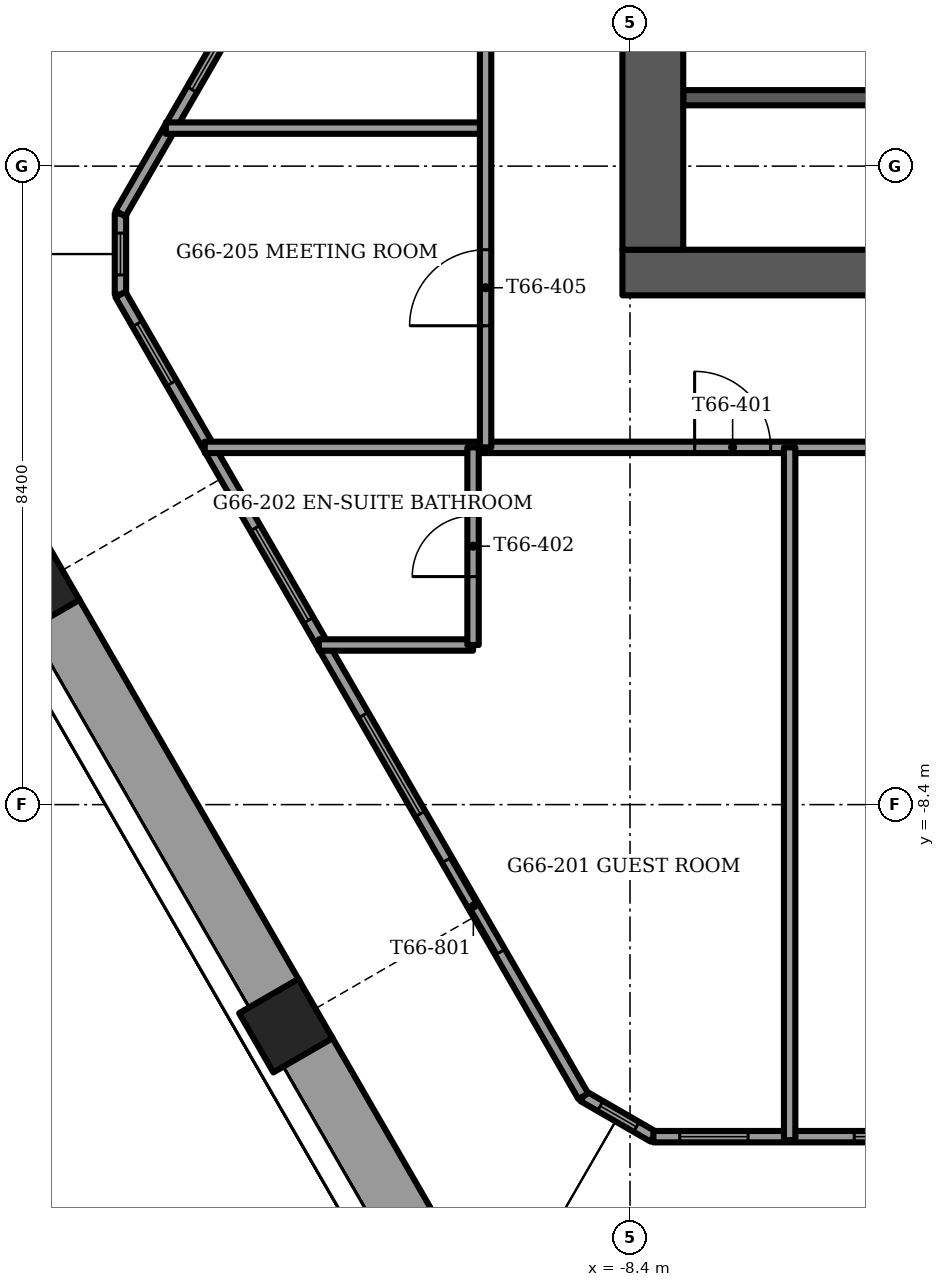
"""IFC4 building model, lengths in metres.
Left out: names, types, materials, properties, quantities, classifications, styles, units other than length and angle.
Written with IfcOpenShell. Run it as: python <this file> out.ifc"""

import sys

from ifc_helpers import new_model, si_unit, direction, frame, frame_2d, origin, origin_2d, place, context, subcontext, project, spatial, rectangle, extrude, element, fill, save


model = new_model("IFC4")
c1 = context("Model", 3, precision=1e-05, world=origin(), true_north=direction((0.0, 1.0)))
c2 = subcontext(c1, "Body", "Model", "MODEL_VIEW")
j1 = project(units=[si_unit("LENGTHUNIT", "METRE"), si_unit("PLANEANGLEUNIT", "RADIAN")], contexts=[c1])
p1 = place(None, origin())
s1 = spatial("IfcSite", under=j1, at=p1, CompositionType="ELEMENT")
p2 = place(p1, origin())
s2 = spatial("IfcBuilding", under=s1, at=p2, CompositionType="ELEMENT")
p3 = place(p2, frame((0.0, 0.0, 267.5)))
s3 = spatial("IfcBuildingStorey", under=s2, at=p3, CompositionType="ELEMENT", Elevation=267.5)
for number, where, z_axis, x_axis in (
    (1, (-16.257, -5.542, -1.2), (0.0, 0.0, 1.0), (-0.5, 0.866, 0.0)),
    (2, (-12.928, -11.308, -1.2), (0.0, 0.0, 1.0), (-0.5, 0.866, 0.0)),
):
    element("IfcColumn", number, at=place(p3, frame(where, z_axis=z_axis, x_axis=x_axis)), inside=s3, PredefinedType="COLUMN", context=c2, shape_type="SweptSolid", body=[
        extrude(rectangle(XDim=0.9, YDim=0.9, at=origin_2d()), origin(), (0.0, 0.0, 1.0), 3.75),
    ])
p4 = place(p3, frame((-8.5, -1.4, -0.3), z_axis=(0.0, 0.0, 1.0), x_axis=(1.0, 0.0, 0.0)))
e3 = element("IfcWall", 3, at=p4, inside=s3, PredefinedType="SHEAR", context=c2, shape_type="SweptSolid", body=[
    extrude(rectangle(XDim=17.0, YDim=0.6, at=frame_2d((8.5, 0.0))), origin(), (0.0, 0.0, 1.0), 3.75),
])
p5 = place(p4, frame((7.7, 0.0, 0.0)))
e4 = element("IfcOpeningElement", 4, at=p5, cuts=e3, PredefinedType="OPENING", context=c2, shape_type="SweptSolid", body=[
    extrude(rectangle(XDim=1.6, YDim=2.1, at=frame_2d((0.8, 1.05))), frame((0.0, 0.3, 0.0), z_axis=(0.0, -1.0, 0.0), x_axis=(1.0, 0.0, 0.0)), (0.0, 0.0, 1.0), 0.6),
])
p6 = place(p3, frame((-8.1, -1.1, -0.3), z_axis=(0.0, 0.0, 1.0), x_axis=(0.0, 1.0, 0.0)))
e5 = element("IfcWall", 5, at=p6, inside=s3, PredefinedType="SHEAR", context=c2, shape_type="SweptSolid", body=[
    extrude(rectangle(XDim=10.2, YDim=0.8, at=frame_2d((5.1, 0.0))), origin(), (0.0, 0.0, 1.0), 3.75),
])
p7 = place(p6, frame((8.35, 0.0, 0.0)))
e6 = element("IfcOpeningElement", 6, at=p7, cuts=e5, PredefinedType="OPENING", context=c2, shape_type="SweptSolid", body=[
    extrude(rectangle(XDim=1.1, YDim=2.1, at=frame_2d((0.55, 1.05))), frame((0.0, 0.4, 0.0), z_axis=(0.0, -1.0, 0.0), x_axis=(1.0, 0.0, 0.0)), (0.0, 0.0, 1.0), 0.8),
])
p8 = place(p3, frame((-15.466, 4.6, 0.0), z_axis=(0.0, 0.0, 1.0), x_axis=(-0.499984362083, -0.866034432152, 0.0)))
e7 = element("IfcWall", 7, at=p8, inside=s3, PredefinedType="PARAPET", context=c2, shape_type="SweptSolid", body=[
    extrude(rectangle(XDim=6.159, YDim=0.9, at=frame_2d((3.08, 0.0))), origin(), (0.0, 0.0, 1.0), 1.1),
])
p9 = place(p3, frame((-16.047, -5.906, 0.0), z_axis=(0.0, 0.0, 1.0), x_axis=(0.500015433515, -0.866016493057, 0.0)))
e8 = element("IfcWall", 8, at=p9, inside=s3, PredefinedType="PARAPET", context=c2, shape_type="SweptSolid", body=[
    extrude(rectangle(XDim=5.819, YDim=0.9, at=frame_2d((2.909, 0.0))), origin(), (0.0, 0.0, 1.0), 1.1),
])
p10 = place(p3, frame((-12.718, -11.672, 0.0), z_axis=(0.0, 0.0, 1.0), x_axis=(0.50000550616, -0.866022224778, 0.0)))
e9 = element("IfcWall", 9, at=p10, inside=s3, PredefinedType="PARAPET", context=c2, shape_type="SweptSolid", body=[
    extrude(rectangle(XDim=4.156, YDim=0.9, at=frame_2d((2.078, 0.0))), origin(), (0.0, 0.0, 1.0), 1.1),
])
p11 = place(p3, frame((-5.626, 15.792, 0.0), z_axis=(0.0, 0.0, 1.0), x_axis=(-0.499998195608, -0.866026445548, 0.0)))
e10 = element("IfcWall", 10, at=p11, inside=s3, PredefinedType="SOLIDWALL", context=c2, shape_type="SweptSolid", body=[
    extrude(rectangle(XDim=18.956, YDim=0.15, at=frame_2d((9.478, 0.0))), origin(), (0.0, 0.0, 1.0), 3.45),
])
p12 = place(p11, frame((3.577, 0.0, 0.0)))
e11 = element("IfcOpeningElement", 11, at=p12, cuts=e10, PredefinedType="OPENING", context=c2, shape_type="SweptSolid", body=[
    extrude(rectangle(XDim=1.4, YDim=2.4, at=frame_2d((0.7, 1.2))), frame((0.0, 0.075, 0.0), z_axis=(0.0, -1.0, 0.0), x_axis=(1.0, 0.0, 0.0)), (0.0, 0.0, 1.0), 0.15),
])
p13 = place(p11, frame((9.62, 0.0, 0.15)))
e12 = element("IfcOpeningElement", 12, at=p13, cuts=e10, PredefinedType="OPENING", context=c2, shape_type="SweptSolid", body=[
    extrude(rectangle(XDim=0.9, YDim=2.85, at=frame_2d((0.45, 1.425))), frame((0.0, 0.075, 0.0), z_axis=(0.0, -1.0, 0.0), x_axis=(1.0, 0.0, 0.0)), (0.0, 0.0, 1.0), 0.15),
])
p14 = place(p11, frame((7.52, 0.0, 0.15)))
e13 = element("IfcOpeningElement", 13, at=p14, cuts=e10, PredefinedType="OPENING", context=c2, shape_type="SweptSolid", body=[
    extrude(rectangle(XDim=1.4, YDim=2.85, at=frame_2d((0.7, 1.425))), frame((0.0, 0.075, 0.0), z_axis=(0.0, -1.0, 0.0), x_axis=(1.0, 0.0, 0.0)), (0.0, 0.0, 1.0), 0.15),
])
p15 = place(p11, frame((11.164, 0.0, 0.15)))
e14 = element("IfcOpeningElement", 14, at=p15, cuts=e10, PredefinedType="OPENING", context=c2, shape_type="SweptSolid", body=[
    extrude(rectangle(XDim=1.5, YDim=2.85, at=frame_2d((0.75, 1.425))), frame((0.0, 0.075, 0.0), z_axis=(0.0, -1.0, 0.0), x_axis=(1.0, 0.0, 0.0)), (0.0, 0.0, 1.0), 0.15),
])
p16 = place(p11, frame((13.364, 0.0, 0.15)))
e15 = element("IfcOpeningElement", 15, at=p16, cuts=e10, PredefinedType="OPENING", context=c2, shape_type="SweptSolid", body=[
    extrude(rectangle(XDim=1.4, YDim=2.85, at=frame_2d((0.7, 1.425))), frame((0.0, 0.075, 0.0), z_axis=(0.0, -1.0, 0.0), x_axis=(1.0, 0.0, 0.0)), (0.0, 0.0, 1.0), 0.15),
])
p17 = place(p11, frame((0.394, 0.0, 0.15)))
e16 = element("IfcOpeningElement", 16, at=p17, cuts=e10, PredefinedType="OPENING", context=c2, shape_type="SweptSolid", body=[
    extrude(rectangle(XDim=1.5, YDim=2.73, at=frame_2d((0.75, 1.365))), frame((0.0, 0.075, 0.0), z_axis=(0.0, -1.0, 0.0), x_axis=(1.0, 0.0, 0.0)), (0.0, 0.0, 1.0), 0.15),
])
p18 = place(p11, frame((15.574, 0.0, 0.15)))
e17 = element("IfcOpeningElement", 17, at=p18, cuts=e10, PredefinedType="OPENING", context=c2, shape_type="SweptSolid", body=[
    extrude(rectangle(XDim=1.5, YDim=2.73, at=frame_2d((0.75, 1.365))), frame((0.0, 0.075, 0.0), z_axis=(0.0, -1.0, 0.0), x_axis=(1.0, 0.0, 0.0)), (0.0, 0.0, 1.0), 0.15),
])
p19 = place(p3, frame((-15.104, -1.689, 0.0), z_axis=(0.0, 0.0, 1.0), x_axis=(0.499998361514, -0.866026349763, 0.0)))
e18 = element("IfcWall", 18, at=p19, inside=s3, PredefinedType="SOLIDWALL", context=c2, shape_type="SweptSolid", body=[
    extrude(rectangle(XDim=12.179, YDim=0.15, at=frame_2d((6.089, 0.0))), origin(), (0.0, 0.0, 1.0), 3.45),
])
p20 = place(p19, frame((3.548, 0.0, 0.15)))
e19 = element("IfcOpeningElement", 19, at=p20, cuts=e18, PredefinedType="OPENING", context=c2, shape_type="SweptSolid", body=[
    extrude(rectangle(XDim=1.4, YDim=2.85, at=frame_2d((0.7, 1.425))), frame((0.0, 0.075, 0.0), z_axis=(0.0, -1.0, 0.0), x_axis=(1.0, 0.0, 0.0)), (0.0, 0.0, 1.0), 0.15),
])
p21 = place(p19, frame((6.389, 0.0, 0.15)))
e20 = element("IfcOpeningElement", 20, at=p21, cuts=e18, PredefinedType="OPENING", context=c2, shape_type="SweptSolid", body=[
    extrude(rectangle(XDim=1.5, YDim=2.85, at=frame_2d((0.75, 1.425))), frame((0.0, 0.075, 0.0), z_axis=(0.0, -1.0, 0.0), x_axis=(1.0, 0.0, 0.0)), (0.0, 0.0, 1.0), 0.15),
])
p22 = place(p19, frame((8.589, 0.0, 0.0)))
e21 = element("IfcOpeningElement", 21, at=p22, cuts=e18, PredefinedType="OPENING", context=c2, shape_type="SweptSolid", body=[
    extrude(rectangle(XDim=1.4, YDim=2.4, at=frame_2d((0.7, 1.2))), frame((0.0, 0.075, 0.0), z_axis=(0.0, -1.0, 0.0), x_axis=(1.0, 0.0, 0.0)), (0.0, 0.0, 1.0), 0.15),
])
p23 = place(p19, frame((0.445, 0.0, 0.15)))
e22 = element("IfcOpeningElement", 22, at=p23, cuts=e18, PredefinedType="OPENING", context=c2, shape_type="SweptSolid", body=[
    extrude(rectangle(XDim=0.9, YDim=2.73, at=frame_2d((0.45, 1.365))), frame((0.0, 0.075, 0.0), z_axis=(0.0, -1.0, 0.0), x_axis=(1.0, 0.0, 0.0)), (0.0, 0.0, 1.0), 0.15),
])
p24 = place(p3, frame((-8.092, -12.769, 0.0), z_axis=(0.0, 0.0, 1.0), x_axis=(1.0, 0.0, 0.0)))
e23 = element("IfcWall", 23, at=p24, inside=s3, PredefinedType="SOLIDWALL", context=c2, shape_type="SweptSolid", body=[
    extrude(rectangle(XDim=16.185, YDim=0.15, at=frame_2d((8.092, 0.0))), origin(), (0.0, 0.0, 1.0), 3.45),
])
p25 = place(p24, frame((2.642, 0.0, 0.15)))
e24 = element("IfcOpeningElement", 24, at=p25, cuts=e23, PredefinedType="OPENING", context=c2, shape_type="SweptSolid", body=[
    extrude(rectangle(XDim=1.5, YDim=2.85, at=frame_2d((0.75, 1.425))), frame((0.0, 0.075, 0.0), z_axis=(0.0, -1.0, 0.0), x_axis=(1.0, 0.0, 0.0)), (0.0, 0.0, 1.0), 0.15),
])
p26 = place(p24, frame((4.292, 0.0, 0.15)))
e25 = element("IfcOpeningElement", 25, at=p26, cuts=e23, PredefinedType="OPENING", context=c2, shape_type="SweptSolid", body=[
    extrude(rectangle(XDim=1.4, YDim=2.85, at=frame_2d((0.7, 1.425))), frame((0.0, 0.075, 0.0), z_axis=(0.0, -1.0, 0.0), x_axis=(1.0, 0.0, 0.0)), (0.0, 0.0, 1.0), 0.15),
])
p27 = place(p24, frame((6.292, 0.0, 0.15)))
e26 = element("IfcOpeningElement", 26, at=p27, cuts=e23, PredefinedType="OPENING", context=c2, shape_type="SweptSolid", body=[
    extrude(rectangle(XDim=1.5, YDim=2.85, at=frame_2d((0.75, 1.425))), frame((0.0, 0.075, 0.0), z_axis=(0.0, -1.0, 0.0), x_axis=(1.0, 0.0, 0.0)), (0.0, 0.0, 1.0), 0.15),
])
p28 = place(p24, frame((8.442, 0.0, 0.15)))
e27 = element("IfcOpeningElement", 27, at=p28, cuts=e23, PredefinedType="OPENING", context=c2, shape_type="SweptSolid", body=[
    extrude(rectangle(XDim=1.4, YDim=2.85, at=frame_2d((0.7, 1.425))), frame((0.0, 0.075, 0.0), z_axis=(0.0, -1.0, 0.0), x_axis=(1.0, 0.0, 0.0)), (0.0, 0.0, 1.0), 0.15),
])
p29 = place(p24, frame((10.542, 0.0, 0.15)))
e28 = element("IfcOpeningElement", 28, at=p29, cuts=e23, PredefinedType="OPENING", context=c2, shape_type="SweptSolid", body=[
    extrude(rectangle(XDim=0.9, YDim=2.85, at=frame_2d((0.45, 1.425))), frame((0.0, 0.075, 0.0), z_axis=(0.0, -1.0, 0.0), x_axis=(1.0, 0.0, 0.0)), (0.0, 0.0, 1.0), 0.15),
])
p30 = place(p24, frame((11.592, 0.0, 0.0)))
e29 = element("IfcOpeningElement", 29, at=p30, cuts=e23, PredefinedType="OPENING", context=c2, shape_type="SweptSolid", body=[
    extrude(rectangle(XDim=1.4, YDim=2.4, at=frame_2d((0.7, 1.2))), frame((0.0, 0.075, 0.0), z_axis=(0.0, -1.0, 0.0), x_axis=(1.0, 0.0, 0.0)), (0.0, 0.0, 1.0), 0.15),
])
p31 = place(p24, frame((0.346, 0.0, 0.15)))
e30 = element("IfcOpeningElement", 30, at=p31, cuts=e23, PredefinedType="OPENING", context=c2, shape_type="SweptSolid", body=[
    extrude(rectangle(XDim=0.9, YDim=2.73, at=frame_2d((0.45, 1.365))), frame((0.0, 0.075, 0.0), z_axis=(0.0, -1.0, 0.0), x_axis=(1.0, 0.0, 0.0)), (0.0, 0.0, 1.0), 0.15),
])
p32 = place(p24, frame((14.889, 0.0, 0.15)))
e31 = element("IfcOpeningElement", 31, at=p32, cuts=e23, PredefinedType="OPENING", context=c2, shape_type="SweptSolid", body=[
    extrude(rectangle(XDim=0.9, YDim=2.73, at=frame_2d((0.45, 1.365))), frame((0.0, 0.075, 0.0), z_axis=(0.0, -1.0, 0.0), x_axis=(1.0, 0.0, 0.0)), (0.0, 0.0, 1.0), 0.15),
])
p33 = place(p3, frame((-15.104, -0.624, 0.0), z_axis=(0.0, 0.0, 1.0), x_axis=(0.0, -1.0, 0.0)))
e32 = element("IfcWall", 32, at=p33, inside=s3, PredefinedType="SOLIDWALL", context=c2, shape_type="SweptSolid", body=[
    extrude(rectangle(XDim=1.065, YDim=0.15, at=frame_2d((0.532, 0.0))), origin(), (0.0, 0.0, 1.0), 3.45),
])
p34 = place(p33, frame((0.258, 0.0, 0.15)))
e33 = element("IfcOpeningElement", 33, at=p34, cuts=e32, PredefinedType="OPENING", context=c2, shape_type="SweptSolid", body=[
    extrude(rectangle(XDim=0.55, YDim=2.85, at=frame_2d((0.275, 1.425))), frame((0.0, 0.075, 0.0), z_axis=(0.0, -1.0, 0.0), x_axis=(1.0, 0.0, 0.0)), (0.0, 0.0, 1.0), 0.15),
])
p35 = place(p3, frame((-9.015, -12.236, 0.0), z_axis=(0.0, 0.0, 1.0), x_axis=(0.866048165231, -0.499960573946, 0.0)))
e34 = element("IfcWall", 34, at=p35, inside=s3, PredefinedType="SOLIDWALL", context=c2, shape_type="SweptSolid", body=[
    extrude(rectangle(XDim=1.065, YDim=0.15, at=frame_2d((0.532, 0.0))), origin(), (0.0, 0.0, 1.0), 3.45),
])
p36 = place(p35, frame((0.258, 0.0, 0.15)))
e35 = element("IfcOpeningElement", 35, at=p36, cuts=e34, PredefinedType="OPENING", context=c2, shape_type="SweptSolid", body=[
    extrude(rectangle(XDim=0.55, YDim=2.85, at=frame_2d((0.275, 1.425))), frame((0.0, 0.075, 0.0), z_axis=(0.0, -1.0, 0.0), x_axis=(1.0, 0.0, 0.0)), (0.0, 0.0, 1.0), 0.15),
])
p37 = place(p3, frame((-7.7, 0.9, -0.3), z_axis=(0.0, 0.0, 1.0), x_axis=(1.0, 0.0, 0.0)))
e36 = element("IfcWall", 36, at=p37, inside=s3, PredefinedType="SOLIDWALL", context=c2, shape_type="SweptSolid", body=[
    extrude(rectangle(XDim=3.25, YDim=0.2, at=frame_2d((1.625, 0.0))), origin(), (0.0, 0.0, 1.0), 3.75),
])
p38 = place(p3, frame((-12.494, -6.3, 0.0), z_axis=(0.0, 0.0, 1.0), x_axis=(1.0, 0.0, 0.0)))
e37 = element("IfcWall", 37, at=p38, inside=s3, PredefinedType="PARTITIONING", context=c2, shape_type="SweptSolid", body=[
    extrude(rectangle(XDim=2.029, YDim=0.15, at=frame_2d((1.014, 0.0))), origin(), (0.0, 0.0, 1.0), 3.45),
])
p39 = place(p3, frame((-13.995, -3.7, 0.0), z_axis=(0.0, 0.0, 1.0), x_axis=(1.0, 0.0, 0.0)))
e38 = element("IfcWall", 38, at=p39, inside=s3, PredefinedType="PARTITIONING", context=c2, shape_type="SweptSolid", body=[
    extrude(rectangle(XDim=19.785, YDim=0.15, at=frame_2d((9.893, 0.0))), origin(), (0.0, 0.0, 1.0), 3.45),
])
p40 = place(p39, frame((11.395, 0.0, 0.0)))
e39 = element("IfcOpeningElement", 39, at=p40, cuts=e38, PredefinedType="OPENING", context=c2, shape_type="SweptSolid", body=[
    extrude(rectangle(XDim=1.0, YDim=2.1, at=frame_2d((0.5, 1.05))), frame((0.0, 0.075, 0.0), z_axis=(0.0, -1.0, 0.0), x_axis=(1.0, 0.0, 0.0)), (0.0, 0.0, 1.0), 0.15),
])
p41 = place(p39, frame((6.445, 0.0, 0.0)))
e40 = element("IfcOpeningElement", 40, at=p41, cuts=e38, PredefinedType="OPENING", context=c2, shape_type="SweptSolid", body=[
    extrude(rectangle(XDim=1.0, YDim=2.1, at=frame_2d((0.5, 1.05))), frame((0.0, 0.075, 0.0), z_axis=(0.0, -1.0, 0.0), x_axis=(1.0, 0.0, 0.0)), (0.0, 0.0, 1.0), 0.15),
])
p42 = place(p39, frame((16.345, 0.0, 0.0)))
e41 = element("IfcOpeningElement", 41, at=p42, cuts=e38, PredefinedType="OPENING", context=c2, shape_type="SweptSolid", body=[
    extrude(rectangle(XDim=1.0, YDim=2.1, at=frame_2d((0.5, 1.05))), frame((0.0, 0.075, 0.0), z_axis=(0.0, -1.0, 0.0), x_axis=(1.0, 0.0, 0.0)), (0.0, 0.0, 1.0), 0.15),
])
p43 = place(p3, frame((-14.507, 0.5, 0.0), z_axis=(0.0, 0.0, 1.0), x_axis=(1.0, 0.0, 0.0)))
e42 = element("IfcWall", 42, at=p43, inside=s3, PredefinedType="PARTITIONING", context=c2, shape_type="SweptSolid", body=[
    extrude(rectangle(XDim=4.207, YDim=0.15, at=frame_2d((2.104, 0.0))), origin(), (0.0, 0.0, 1.0), 3.45),
])
p44 = place(p3, frame((-6.3, -12.814, 0.0), z_axis=(0.0, 0.0, 1.0), x_axis=(0.0, 1.0, 0.0)))
e43 = element("IfcWall", 43, at=p44, inside=s3, PredefinedType="PARTITIONING", context=c2, shape_type="SweptSolid", body=[
    extrude(rectangle(XDim=9.114, YDim=0.15, at=frame_2d((4.557, 0.0))), origin(), (0.0, 0.0, 1.0), 3.45),
])
p45 = place(p3, frame((-10.3, -3.7, 0.0), z_axis=(0.0, 0.0, 1.0), x_axis=(0.0, 1.0, 0.0)))
e44 = element("IfcWall", 44, at=p45, inside=s3, PredefinedType="PARTITIONING", context=c2, shape_type="SweptSolid", body=[
    extrude(rectangle(XDim=11.487, YDim=0.15, at=frame_2d((5.744, 0.0))), origin(), (0.0, 0.0, 1.0), 3.45),
])
p46 = place(p45, frame((1.6, 0.0, 0.0)))
e45 = element("IfcOpeningElement", 45, at=p46, cuts=e44, PredefinedType="OPENING", context=c2, shape_type="SweptSolid", body=[
    extrude(rectangle(XDim=1.0, YDim=2.1, at=frame_2d((0.5, 1.05))), frame((0.0, 0.075, 0.0), z_axis=(0.0, -1.0, 0.0), x_axis=(1.0, 0.0, 0.0)), (0.0, 0.0, 1.0), 0.15),
])
p47 = place(p45, frame((7.222, 0.0, 0.0)))
e46 = element("IfcOpeningElement", 46, at=p47, cuts=e44, PredefinedType="OPENING", context=c2, shape_type="SweptSolid", body=[
    extrude(rectangle(XDim=1.0, YDim=2.1, at=frame_2d((0.5, 1.05))), frame((0.0, 0.075, 0.0), z_axis=(0.0, -1.0, 0.0), x_axis=(1.0, 0.0, 0.0)), (0.0, 0.0, 1.0), 0.15),
])
p48 = place(p3, frame((-10.465, -6.3, 0.0), z_axis=(0.0, 0.0, 1.0), x_axis=(0.0, 1.0, 0.0)))
e47 = element("IfcWall", 47, at=p48, inside=s3, PredefinedType="PARTITIONING", context=c2, shape_type="SweptSolid", body=[
    extrude(rectangle(XDim=2.6, YDim=0.15, at=frame_2d((1.3, 0.0))), origin(), (0.0, 0.0, 1.0), 3.45),
])
p49 = place(p48, frame((0.9, 0.0, 0.0)))
e48 = element("IfcOpeningElement", 48, at=p49, cuts=e47, PredefinedType="OPENING", context=c2, shape_type="SweptSolid", body=[
    extrude(rectangle(XDim=0.8, YDim=2.1, at=frame_2d((0.4, 1.05))), frame((0.0, 0.075, 0.0), z_axis=(0.0, -1.0, 0.0), x_axis=(1.0, 0.0, 0.0)), (0.0, 0.0, 1.0), 0.15),
])
p50 = place(p18, origin())
e49 = element("IfcWindow", 49, at=p50, inside=s3, PartitioningType="SINGLE_PANEL", PredefinedType="WINDOW", context=c2, shape_type="SweptSolid", body=[
    extrude(rectangle(XDim=1.5, YDim=2.73, at=frame_2d((0.75, 1.365))), frame((0.0, 0.03, 0.0), z_axis=(0.0, -1.0, 0.0), x_axis=(1.0, 0.0, 0.0)), (0.0, 0.0, 1.0), 0.06),
])
fill(e17, e49)
p51 = place(p20, origin())
e50 = element("IfcWindow", 50, at=p51, inside=s3, PartitioningType="SINGLE_PANEL", PredefinedType="WINDOW", context=c2, shape_type="SweptSolid", body=[
    extrude(rectangle(XDim=1.4, YDim=2.85, at=frame_2d((0.7, 1.425))), frame((0.0, 0.03, 0.0), z_axis=(0.0, -1.0, 0.0), x_axis=(1.0, 0.0, 0.0)), (0.0, 0.0, 1.0), 0.06),
])
fill(e19, e50)
p52 = place(p21, origin())
e51 = element("IfcWindow", 51, at=p52, inside=s3, PartitioningType="SINGLE_PANEL", PredefinedType="WINDOW", context=c2, shape_type="SweptSolid", body=[
    extrude(rectangle(XDim=1.5, YDim=2.85, at=frame_2d((0.75, 1.425))), frame((0.0, 0.03, 0.0), z_axis=(0.0, -1.0, 0.0), x_axis=(1.0, 0.0, 0.0)), (0.0, 0.0, 1.0), 0.06),
])
fill(e20, e51)
p53 = place(p22, origin())
e52 = element("IfcDoor", 52, at=p53, inside=s3, OperationType="SLIDING_TO_RIGHT", PredefinedType="DOOR", context=c2, shape_type="SweptSolid", body=[
    extrude(rectangle(XDim=1.4, YDim=2.4, at=frame_2d((0.7, 1.2))), frame((0.0, 0.025, 0.0), z_axis=(0.0, -1.0, 0.0), x_axis=(1.0, 0.0, 0.0)), (0.0, 0.0, 1.0), 0.05),
])
fill(e21, e52)
p54 = place(p23, origin())
e53 = element("IfcWindow", 53, at=p54, inside=s3, PartitioningType="SINGLE_PANEL", PredefinedType="WINDOW", context=c2, shape_type="SweptSolid", body=[
    extrude(rectangle(XDim=0.9, YDim=2.73, at=frame_2d((0.45, 1.365))), frame((0.0, 0.03, 0.0), z_axis=(0.0, -1.0, 0.0), x_axis=(1.0, 0.0, 0.0)), (0.0, 0.0, 1.0), 0.06),
])
fill(e22, e53)
p55 = place(p25, origin())
e54 = element("IfcWindow", 54, at=p55, inside=s3, PartitioningType="SINGLE_PANEL", PredefinedType="WINDOW", context=c2, shape_type="SweptSolid", body=[
    extrude(rectangle(XDim=1.5, YDim=2.85, at=frame_2d((0.75, 1.425))), frame((0.0, 0.03, 0.0), z_axis=(0.0, -1.0, 0.0), x_axis=(1.0, 0.0, 0.0)), (0.0, 0.0, 1.0), 0.06),
])
fill(e24, e54)
p56 = place(p31, origin())
e55 = element("IfcWindow", 55, at=p56, inside=s3, PartitioningType="SINGLE_PANEL", PredefinedType="WINDOW", context=c2, shape_type="SweptSolid", body=[
    extrude(rectangle(XDim=0.9, YDim=2.73, at=frame_2d((0.45, 1.365))), frame((0.0, 0.03, 0.0), z_axis=(0.0, -1.0, 0.0), x_axis=(1.0, 0.0, 0.0)), (0.0, 0.0, 1.0), 0.06),
])
fill(e30, e55)
p57 = place(p34, origin())
e56 = element("IfcWindow", 56, at=p57, inside=s3, PartitioningType="SINGLE_PANEL", PredefinedType="WINDOW", context=c2, shape_type="SweptSolid", body=[
    extrude(rectangle(XDim=0.55, YDim=2.85, at=frame_2d((0.275, 1.425))), frame((0.0, 0.03, 0.0), z_axis=(0.0, -1.0, 0.0), x_axis=(1.0, 0.0, 0.0)), (0.0, 0.0, 1.0), 0.06),
])
fill(e33, e56)
p58 = place(p36, origin())
e57 = element("IfcWindow", 57, at=p58, inside=s3, PartitioningType="SINGLE_PANEL", PredefinedType="WINDOW", context=c2, shape_type="SweptSolid", body=[
    extrude(rectangle(XDim=0.55, YDim=2.85, at=frame_2d((0.275, 1.425))), frame((0.0, 0.03, 0.0), z_axis=(0.0, -1.0, 0.0), x_axis=(1.0, 0.0, 0.0)), (0.0, 0.0, 1.0), 0.06),
])
fill(e35, e57)
p59 = place(p41, origin())
e58 = element("IfcDoor", 58, at=p59, inside=s3, OperationType="SINGLE_SWING_RIGHT", PredefinedType="DOOR", context=c2, shape_type="SweptSolid", body=[
    extrude(rectangle(XDim=1.0, YDim=2.1, at=frame_2d((0.5, 1.05))), frame((0.0, 0.025, 0.0), z_axis=(0.0, -1.0, 0.0), x_axis=(1.0, 0.0, 0.0)), (0.0, 0.0, 1.0), 0.05),
])
fill(e40, e58)
p60 = place(p49, origin())
e59 = element("IfcDoor", 59, at=p60, inside=s3, OperationType="SINGLE_SWING_RIGHT", PredefinedType="DOOR", context=c2, shape_type="SweptSolid", body=[
    extrude(rectangle(XDim=0.8, YDim=2.1, at=frame_2d((0.4, 1.05))), frame((0.0, 0.025, 0.0), z_axis=(0.0, -1.0, 0.0), x_axis=(1.0, 0.0, 0.0)), (0.0, 0.0, 1.0), 0.05),
])
fill(e48, e59)
p61 = place(p46, origin())
e60 = element("IfcDoor", 60, at=p61, inside=s3, OperationType="SINGLE_SWING_RIGHT", PredefinedType="DOOR", context=c2, shape_type="SweptSolid", body=[
    extrude(rectangle(XDim=1.0, YDim=2.1, at=frame_2d((0.5, 1.05))), frame((0.0, 0.025, 0.0), z_axis=(0.0, -1.0, 0.0), x_axis=(1.0, 0.0, 0.0)), (0.0, 0.0, 1.0), 0.05),
])
fill(e45, e60)
save(model, sys.argv[1])
